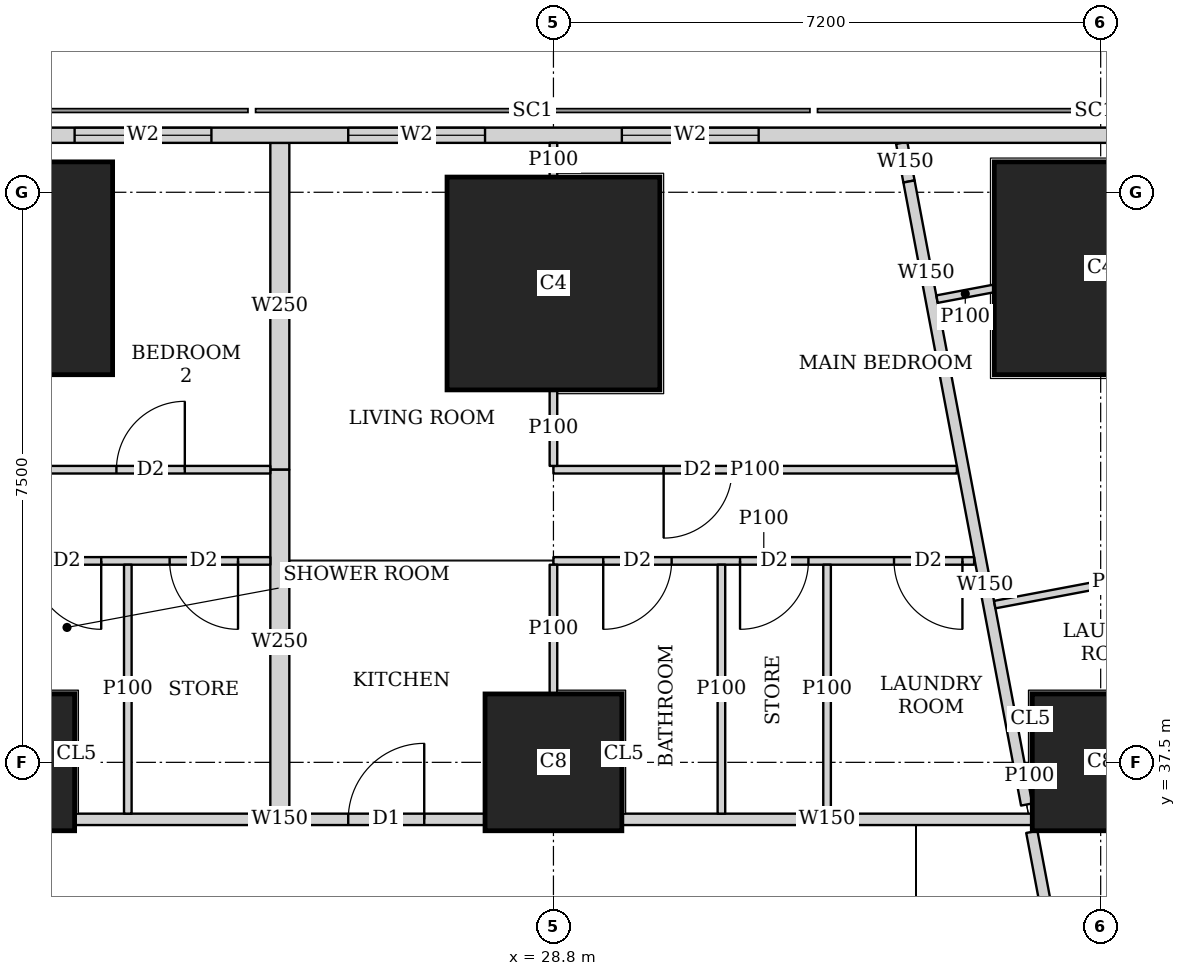
"""IFC4 building model, lengths in metres.
Left out: names, types, materials, properties, quantities, classifications, styles, units other than length and angle.
Written with IfcOpenShell. Run it as: python <this file> out.ifc"""

import sys

from ifc_helpers import new_model, si_unit, direction, frame, frame_2d, origin, origin_2d, place, context, subcontext, project, spatial, rectangle, extrude, element, fill, save


model = new_model("IFC4")
c1 = context("Model", 3, precision=1e-05, world=origin(), true_north=direction((0.0, 1.0)))
c2 = subcontext(c1, "Body", "Model", "MODEL_VIEW")
j1 = project(units=[si_unit("LENGTHUNIT", "METRE"), si_unit("PLANEANGLEUNIT", "RADIAN")], contexts=[c1])
p1 = place(None, origin())
s1 = spatial("IfcSite", under=j1, at=p1, CompositionType="ELEMENT")
p2 = place(p1, origin())
s2 = spatial("IfcBuilding", under=s1, at=p2, CompositionType="ELEMENT")
p3 = place(p2, frame((0.0, 0.0, 31.25)))
s3 = spatial("IfcBuildingStorey", under=s2, at=p3, CompositionType="ELEMENT", Elevation=31.25)
for number, where, z_axis, x_axis in (
    (1, (21.6, 37.5, 0.0), (0.0, 0.0, 1.0), (1.0, 0.0, 0.0)),
    (2, (28.8, 37.5, 0.0), (0.0, 0.0, 1.0), (1.0, 0.0, 0.0)),
    (3, (36.0, 37.5, 0.0), (0.0, 0.0, 1.0), (1.0, 0.0, 0.0)),
):
    element("IfcColumn", number, at=place(p3, frame(where, z_axis=z_axis, x_axis=x_axis)), inside=s3, PredefinedType="COLUMN", context=c2, shape_type="SweptSolid", body=[
        extrude(rectangle(XDim=1.8, YDim=1.8, at=origin_2d()), origin(), (0.0, 0.0, 1.0), 3.75),
    ])
for number, where, z_axis, x_axis in (
    (4, (21.6, 44.0, 0.0), (0.0, 0.0, 1.0), (1.0, 0.0, 0.0)),
    (5, (28.8, 43.8, 0.0), (0.0, 0.0, 1.0), (1.0, 0.0, 0.0)),
    (6, (36.0, 44.0, 0.0), (0.0, 0.0, 1.0), (1.0, 0.0, 0.0)),
):
    element("IfcColumn", number, at=place(p3, frame(where, z_axis=z_axis, x_axis=x_axis)), inside=s3, PredefinedType="COLUMN", context=c2, shape_type="SweptSolid", body=[
        extrude(rectangle(XDim=2.8, YDim=2.8, at=origin_2d()), origin(), (0.0, 0.0, 1.0), 3.75),
    ])
p4 = place(p3, frame((40.106, 45.75, 0.0), z_axis=(0.0, 0.0, 1.0), x_axis=(-1.0, 0.0, 0.0)))
e7 = element("IfcWall", 7, at=p4, inside=s3, PredefinedType="SOLIDWALL", context=c2, shape_type="SweptSolid", body=[
    extrude(rectangle(XDim=37.943, YDim=0.2, at=frame_2d((18.971, 0.0))), origin(), (0.0, 0.0, 1.0), 3.5),
])
p5 = place(p4, frame((8.606, 0.0, 0.9)))
e8 = element("IfcOpeningElement", 8, at=p5, cuts=e7, PredefinedType="OPENING", context=c2, shape_type="SweptSolid", body=[
    extrude(rectangle(XDim=1.8, YDim=1.5, at=frame_2d((0.9, 0.75))), frame((0.0, 0.11, 0.0), z_axis=(0.0, -1.0, 0.0), x_axis=(1.0, 0.0, 0.0)), (0.0, 0.0, 1.0), 0.22),
])
p6 = place(p4, frame((12.206, 0.0, 0.9)))
e9 = element("IfcOpeningElement", 9, at=p6, cuts=e7, PredefinedType="OPENING", context=c2, shape_type="SweptSolid", body=[
    extrude(rectangle(XDim=1.8, YDim=1.5, at=frame_2d((0.9, 0.75))), frame((0.0, 0.11, 0.0), z_axis=(0.0, -1.0, 0.0), x_axis=(1.0, 0.0, 0.0)), (0.0, 0.0, 1.0), 0.22),
])
p7 = place(p4, frame((15.806, 0.0, 0.9)))
e10 = element("IfcOpeningElement", 10, at=p7, cuts=e7, PredefinedType="OPENING", context=c2, shape_type="SweptSolid", body=[
    extrude(rectangle(XDim=1.8, YDim=1.5, at=frame_2d((0.9, 0.75))), frame((0.0, 0.11, 0.0), z_axis=(0.0, -1.0, 0.0), x_axis=(1.0, 0.0, 0.0)), (0.0, 0.0, 1.0), 0.22),
])
p8 = place(p4, frame((19.406, 0.0, 0.9)))
e11 = element("IfcOpeningElement", 11, at=p8, cuts=e7, PredefinedType="OPENING", context=c2, shape_type="SweptSolid", body=[
    extrude(rectangle(XDim=1.8, YDim=1.5, at=frame_2d((0.9, 0.75))), frame((0.0, 0.11, 0.0), z_axis=(0.0, -1.0, 0.0), x_axis=(1.0, 0.0, 0.0)), (0.0, 0.0, 1.0), 0.22),
])
p9 = place(p4, frame((23.006, 0.0, 0.9)))
e12 = element("IfcOpeningElement", 12, at=p9, cuts=e7, PredefinedType="OPENING", context=c2, shape_type="SweptSolid", body=[
    extrude(rectangle(XDim=1.8, YDim=1.5, at=frame_2d((0.9, 0.75))), frame((0.0, 0.11, 0.0), z_axis=(0.0, -1.0, 0.0), x_axis=(1.0, 0.0, 0.0)), (0.0, 0.0, 1.0), 0.22),
])
p10 = place(p4, frame((26.606, 0.0, 0.9)))
e13 = element("IfcOpeningElement", 13, at=p10, cuts=e7, PredefinedType="OPENING", context=c2, shape_type="SweptSolid", body=[
    extrude(rectangle(XDim=1.8, YDim=1.5, at=frame_2d((0.9, 0.75))), frame((0.0, 0.11, 0.0), z_axis=(0.0, -1.0, 0.0), x_axis=(1.0, 0.0, 0.0)), (0.0, 0.0, 1.0), 0.22),
])
p11 = place(p3, frame((22.501, 36.75, 0.0), z_axis=(0.0, 0.0, 1.0), x_axis=(1.0, 0.0, 0.0)))
e14 = element("IfcWall", 14, at=p11, inside=s3, PredefinedType="SOLIDWALL", context=c2, shape_type="SweptSolid", body=[
    extrude(rectangle(XDim=5.398, YDim=0.15, at=frame_2d((2.699, 0.0))), origin(), (0.0, 0.0, 1.0), 3.5),
])
p12 = place(p11, frame((3.599, 0.0, 0.0)))
e15 = element("IfcOpeningElement", 15, at=p12, cuts=e14, PredefinedType="OPENING", context=c2, shape_type="SweptSolid", body=[
    extrude(rectangle(XDim=1.0, YDim=2.1, at=frame_2d((0.5, 1.05))), frame((0.0, 0.085, 0.0), z_axis=(0.0, -1.0, 0.0), x_axis=(1.0, 0.0, 0.0)), (0.0, 0.0, 1.0), 0.17),
])
p13 = place(p3, frame((29.701, 36.75, 0.0), z_axis=(0.0, 0.0, 1.0), x_axis=(1.0, 0.0, 0.0)))
e16 = element("IfcWall", 16, at=p13, inside=s3, PredefinedType="SOLIDWALL", context=c2, shape_type="SweptSolid", body=[
    extrude(rectangle(XDim=5.399, YDim=0.15, at=frame_2d((2.7, 0.0))), origin(), (0.0, 0.0, 1.0), 3.5),
])
p14 = place(p3, frame((33.382, 45.65, 0.0), z_axis=(0.0, 0.0, 1.0), x_axis=(0.185657456326, -0.982614527122, 0.0)))
e17 = element("IfcWall", 17, at=p14, inside=s3, PredefinedType="SOLIDWALL", context=c2, shape_type="SweptSolid", body=[
    extrude(rectangle(XDim=0.517, YDim=0.15, at=frame_2d((0.258, 0.0))), origin(), (0.0, 0.0, 1.0), 3.5),
])
p15 = place(p3, frame((33.478, 45.142, 0.0), z_axis=(0.0, 0.0, 1.0), x_axis=(0.185393362436, -0.982664388876, 0.0)))
e18 = element("IfcWall", 18, at=p15, inside=s3, PredefinedType="SOLIDWALL", context=c2, shape_type="SweptSolid", body=[
    extrude(rectangle(XDim=2.455, YDim=0.15, at=frame_2d((1.227, 0.0))), origin(), (0.0, 0.0, 1.0), 2.05),
])
p16 = place(p3, frame((33.933, 42.73, 0.0), z_axis=(0.0, 0.0, 1.0), x_axis=(0.185617897238, -0.982622000682, 0.0)))
e19 = element("IfcWall", 19, at=p16, inside=s3, PredefinedType="SOLIDWALL", context=c2, shape_type="SweptSolid", body=[
    extrude(rectangle(XDim=5.887, YDim=0.15, at=frame_2d((2.944, 0.0))), origin(), (0.0, 0.0, 1.0), 3.5),
])
p17 = place(p3, frame((35.094, 36.585, 0.0), z_axis=(0.0, 0.0, 1.0), x_axis=(0.185588860311, -0.982627485331, 0.0)))
e20 = element("IfcWall", 20, at=p17, inside=s3, PredefinedType="SOLIDWALL", context=c2, shape_type="SweptSolid", body=[
    extrude(rectangle(XDim=34.797, YDim=0.15, at=frame_2d((17.399, 0.0))), origin(), (0.0, 0.0, 1.0), 2.5),
])
p18 = place(p17, frame((6.012, 0.0, 0.0)))
e21 = element("IfcOpeningElement", 21, at=p18, cuts=e20, PredefinedType="OPENING", context=c2, shape_type="SweptSolid", body=[
    extrude(rectangle(XDim=1.0, YDim=2.1, at=frame_2d((0.5, 1.05))), frame((0.0, 0.085, 0.0), z_axis=(0.0, -1.0, 0.0), x_axis=(1.0, 0.0, 0.0)), (0.0, 0.0, 1.0), 0.17),
])
p19 = place(p17, frame((9.828, 0.0, 0.0)))
e22 = element("IfcOpeningElement", 22, at=p19, cuts=e20, PredefinedType="OPENING", context=c2, shape_type="SweptSolid", body=[
    extrude(rectangle(XDim=1.0, YDim=2.1, at=frame_2d((0.5, 1.05))), frame((0.0, 0.085, 0.0), z_axis=(0.0, -1.0, 0.0), x_axis=(1.0, 0.0, 0.0)), (0.0, 0.0, 1.0), 0.17),
])
p20 = place(p17, frame((25.9, 0.0, 0.0)))
e23 = element("IfcOpeningElement", 23, at=p20, cuts=e20, PredefinedType="OPENING", context=c2, shape_type="SweptSolid", body=[
    extrude(rectangle(XDim=1.0, YDim=2.1, at=frame_2d((0.5, 1.05))), frame((0.0, 0.085, 0.0), z_axis=(0.0, -1.0, 0.0), x_axis=(1.0, 0.0, 0.0)), (0.0, 0.0, 1.0), 0.17),
])
p21 = place(p3, frame((34.59, 43.734, 0.0), z_axis=(0.0, 0.0, 1.0), x_axis=(-0.98274036184, -0.184990219229, 0.0)))
e24 = element("IfcWall", 24, at=p21, inside=s3, PredefinedType="PARTITIONING", context=c2, shape_type="SweptSolid", body=[
    extrude(rectangle(XDim=0.756, YDim=0.1, at=frame_2d((0.378, 0.0))), origin(), (0.0, 0.0, 1.0), 2.05),
])
p22 = place(p3, frame((37.823, 40.182, 0.0), z_axis=(0.0, 0.0, 1.0), x_axis=(-0.982664729897, -0.18539155487, 0.0)))
e25 = element("IfcWall", 25, at=p22, inside=s3, PredefinedType="PARTITIONING", context=c2, shape_type="SweptSolid", body=[
    extrude(rectangle(XDim=3.274, YDim=0.1, at=frame_2d((1.637, 0.0))), origin(), (0.0, 0.0, 1.0), 3.5),
])
p23 = place(p3, frame((35.09, 37.328, 0.0), z_axis=(0.0, 0.0, 1.0), x_axis=(-0.982590620415, -0.185783940835, 0.0)))
e26 = element("IfcWall", 26, at=p23, inside=s3, PredefinedType="PARTITIONING", context=c2, shape_type="SweptSolid", body=[
    extrude(rectangle(XDim=0.059, YDim=0.1, at=frame_2d((0.03, 0.0))), origin(), (0.0, 0.0, 1.0), 3.5),
])
p24 = place(p3, frame((18.0, 41.35, 0.0), z_axis=(0.0, 0.0, 1.0), x_axis=(1.0, 0.0, 0.0)))
e27 = element("IfcWall", 27, at=p24, inside=s3, PredefinedType="PARTITIONING", context=c2, shape_type="SweptSolid", body=[
    extrude(rectangle(XDim=7.075, YDim=0.1, at=frame_2d((3.538, 0.0))), origin(), (0.0, 0.0, 1.0), 3.5),
])
p25 = place(p24, frame((0.2, 0.0, 0.0)))
e28 = element("IfcOpeningElement", 28, at=p25, cuts=e27, PredefinedType="OPENING", context=c2, shape_type="SweptSolid", body=[
    extrude(rectangle(XDim=0.9, YDim=2.1, at=frame_2d((0.45, 1.05))), frame((0.0, 0.06, 0.0), z_axis=(0.0, -1.0, 0.0), x_axis=(1.0, 0.0, 0.0)), (0.0, 0.0, 1.0), 0.12),
])
p26 = place(p24, frame((5.05, 0.0, 0.0)))
e29 = element("IfcOpeningElement", 29, at=p26, cuts=e27, PredefinedType="OPENING", context=c2, shape_type="SweptSolid", body=[
    extrude(rectangle(XDim=0.9, YDim=2.1, at=frame_2d((0.45, 1.05))), frame((0.0, 0.06, 0.0), z_axis=(0.0, -1.0, 0.0), x_axis=(1.0, 0.0, 0.0)), (0.0, 0.0, 1.0), 0.12),
])
p27 = place(p3, frame((18.0, 40.15, 0.0), z_axis=(0.0, 0.0, 1.0), x_axis=(1.0, 0.0, 0.0)))
e30 = element("IfcWall", 30, at=p27, inside=s3, PredefinedType="PARTITIONING", context=c2, shape_type="SweptSolid", body=[
    extrude(rectangle(XDim=7.075, YDim=0.1, at=frame_2d((3.538, 0.0))), origin(), (0.0, 0.0, 1.0), 3.5),
])
p28 = place(p27, frame((0.655, 0.0, 0.0)))
e31 = element("IfcOpeningElement", 31, at=p28, cuts=e30, PredefinedType="OPENING", context=c2, shape_type="SweptSolid", body=[
    extrude(rectangle(XDim=0.9, YDim=2.1, at=frame_2d((0.45, 1.05))), frame((0.0, 0.06, 0.0), z_axis=(0.0, -1.0, 0.0), x_axis=(1.0, 0.0, 0.0)), (0.0, 0.0, 1.0), 0.12),
])
p29 = place(p27, frame((3.95, 0.0, 0.0)))
e32 = element("IfcOpeningElement", 32, at=p29, cuts=e30, PredefinedType="OPENING", context=c2, shape_type="SweptSolid", body=[
    extrude(rectangle(XDim=0.9, YDim=2.1, at=frame_2d((0.45, 1.05))), frame((0.0, 0.06, 0.0), z_axis=(0.0, -1.0, 0.0), x_axis=(1.0, 0.0, 0.0)), (0.0, 0.0, 1.0), 0.12),
])
p30 = place(p27, frame((2.455, 0.0, 0.0)))
e33 = element("IfcOpeningElement", 33, at=p30, cuts=e30, PredefinedType="OPENING", context=c2, shape_type="SweptSolid", body=[
    extrude(rectangle(XDim=0.9, YDim=2.1, at=frame_2d((0.45, 1.05))), frame((0.0, 0.06, 0.0), z_axis=(0.0, -1.0, 0.0), x_axis=(1.0, 0.0, 0.0)), (0.0, 0.0, 1.0), 0.12),
])
p31 = place(p27, frame((5.75, 0.0, 0.0)))
e34 = element("IfcOpeningElement", 34, at=p31, cuts=e30, PredefinedType="OPENING", context=c2, shape_type="SweptSolid", body=[
    extrude(rectangle(XDim=0.9, YDim=2.1, at=frame_2d((0.45, 1.05))), frame((0.0, 0.06, 0.0), z_axis=(0.0, -1.0, 0.0), x_axis=(1.0, 0.0, 0.0)), (0.0, 0.0, 1.0), 0.12),
])
p32 = place(p3, frame((23.2, 36.825, 0.0), z_axis=(0.0, 0.0, 1.0), x_axis=(0.0, 1.0, 0.0)))
e35 = element("IfcWall", 35, at=p32, inside=s3, PredefinedType="PARTITIONING", context=c2, shape_type="SweptSolid", body=[
    extrude(rectangle(XDim=3.275, YDim=0.1, at=frame_2d((1.638, 0.0))), origin(), (0.0, 0.0, 1.0), 3.5),
])
p33 = place(p3, frame((28.8, 41.35, 0.0), z_axis=(0.0, 0.0, 1.0), x_axis=(1.0, 0.0, 0.0)))
e36 = element("IfcWall", 36, at=p33, inside=s3, PredefinedType="PARTITIONING", context=c2, shape_type="SweptSolid", body=[
    extrude(rectangle(XDim=5.308, YDim=0.1, at=frame_2d((2.654, 0.0))), origin(), (0.0, 0.0, 1.0), 3.5),
])
p34 = place(p33, frame((1.45, 0.0, 0.0)))
e37 = element("IfcOpeningElement", 37, at=p34, cuts=e36, PredefinedType="OPENING", context=c2, shape_type="SweptSolid", body=[
    extrude(rectangle(XDim=0.9, YDim=2.1, at=frame_2d((0.45, 1.05))), frame((0.0, 0.06, 0.0), z_axis=(0.0, -1.0, 0.0), x_axis=(1.0, 0.0, 0.0)), (0.0, 0.0, 1.0), 0.12),
])
p35 = place(p3, frame((28.8, 40.15, 0.0), z_axis=(0.0, 0.0, 1.0), x_axis=(1.0, 0.0, 0.0)))
e38 = element("IfcWall", 38, at=p35, inside=s3, PredefinedType="PARTITIONING", context=c2, shape_type="SweptSolid", body=[
    extrude(rectangle(XDim=5.535, YDim=0.1, at=frame_2d((2.768, 0.0))), origin(), (0.0, 0.0, 1.0), 3.5),
])
p36 = place(p35, frame((0.655, 0.0, 0.0)))
e39 = element("IfcOpeningElement", 39, at=p36, cuts=e38, PredefinedType="OPENING", context=c2, shape_type="SweptSolid", body=[
    extrude(rectangle(XDim=0.9, YDim=2.1, at=frame_2d((0.45, 1.05))), frame((0.0, 0.06, 0.0), z_axis=(0.0, -1.0, 0.0), x_axis=(1.0, 0.0, 0.0)), (0.0, 0.0, 1.0), 0.12),
])
p37 = place(p35, frame((4.481, 0.0, 0.0)))
e40 = element("IfcOpeningElement", 40, at=p37, cuts=e38, PredefinedType="OPENING", context=c2, shape_type="SweptSolid", body=[
    extrude(rectangle(XDim=0.9, YDim=2.1, at=frame_2d((0.45, 1.05))), frame((0.0, 0.06, 0.0), z_axis=(0.0, -1.0, 0.0), x_axis=(1.0, 0.0, 0.0)), (0.0, 0.0, 1.0), 0.12),
])
p38 = place(p35, frame((2.455, 0.0, 0.0)))
e41 = element("IfcOpeningElement", 41, at=p38, cuts=e38, PredefinedType="OPENING", context=c2, shape_type="SweptSolid", body=[
    extrude(rectangle(XDim=0.9, YDim=2.1, at=frame_2d((0.45, 1.05))), frame((0.0, 0.06, 0.0), z_axis=(0.0, -1.0, 0.0), x_axis=(1.0, 0.0, 0.0)), (0.0, 0.0, 1.0), 0.12),
])
p39 = place(p3, frame((28.8, 41.4, 0.0), z_axis=(0.0, 0.0, 1.0), x_axis=(0.0, 1.0, 0.0)))
e42 = element("IfcWall", 42, at=p39, inside=s3, PredefinedType="PARTITIONING", context=c2, shape_type="SweptSolid", body=[
    extrude(rectangle(XDim=0.999, YDim=0.1, at=frame_2d((0.5, 0.0))), origin(), (0.0, 0.0, 1.0), 3.5),
])
p40 = place(p3, frame((28.8, 45.201, 0.0), z_axis=(0.0, 0.0, 1.0), x_axis=(0.0, 1.0, 0.0)))
e43 = element("IfcWall", 43, at=p40, inside=s3, PredefinedType="PARTITIONING", context=c2, shape_type="SweptSolid", body=[
    extrude(rectangle(XDim=0.449, YDim=0.1, at=frame_2d((0.225, 0.0))), origin(), (0.0, 0.0, 1.0), 3.5),
])
p41 = place(p3, frame((28.8, 38.401, 0.0), z_axis=(0.0, 0.0, 1.0), x_axis=(0.0, 1.0, 0.0)))
e44 = element("IfcWall", 44, at=p41, inside=s3, PredefinedType="PARTITIONING", context=c2, shape_type="SweptSolid", body=[
    extrude(rectangle(XDim=1.699, YDim=0.1, at=frame_2d((0.85, 0.0))), origin(), (0.0, 0.0, 1.0), 3.5),
])
for number, where, z_axis, x_axis in (
    (45, (32.4, 36.825, 0.0), (0.0, 0.0, 1.0), (0.0, 1.0, 0.0)),
    (46, (31.01, 36.825, 0.0), (0.0, 0.0, 1.0), (0.0, 1.0, 0.0)),
):
    element("IfcWall", number, at=place(p3, frame(where, z_axis=z_axis, x_axis=x_axis)), inside=s3, PredefinedType="PARTITIONING", context=c2, shape_type="SweptSolid", body=[
        extrude(rectangle(XDim=3.275, YDim=0.1, at=frame_2d((1.638, 0.0))), origin(), (0.0, 0.0, 1.0), 3.5),
    ])
p42 = place(p3, frame((25.2, 41.35, 0.0), z_axis=(0.0, 0.0, 1.0), x_axis=(0.0, 1.0, 0.0)))
e47 = element("IfcWall", 47, at=p42, inside=s3, PredefinedType="SOLIDWALL", context=c2, shape_type="SweptSolid", body=[
    extrude(rectangle(XDim=4.3, YDim=0.25, at=frame_2d((2.15, 0.0))), origin(), (0.0, 0.0, 1.0), 2.05),
])
p43 = place(p3, frame((25.2, 36.825, 0.0), z_axis=(0.0, 0.0, 1.0), x_axis=(0.0, 1.0, 0.0)))
e48 = element("IfcWall", 48, at=p43, inside=s3, PredefinedType="SOLIDWALL", context=c2, shape_type="SweptSolid", body=[
    extrude(rectangle(XDim=4.525, YDim=0.25, at=frame_2d((2.263, 0.0))), origin(), (0.0, 0.0, 1.0), 3.5),
])
p44 = place(p5, origin())
e49 = element("IfcWindow", 49, at=p44, inside=s3, PartitioningType="SINGLE_PANEL", PredefinedType="WINDOW", context=c2, shape_type="SweptSolid", body=[
    extrude(rectangle(XDim=1.8, YDim=1.5, at=frame_2d((0.9, 0.75))), frame((0.0, 0.03, 0.0), z_axis=(0.0, -1.0, 0.0), x_axis=(1.0, 0.0, 0.0)), (0.0, 0.0, 1.0), 0.06),
])
fill(e8, e49)
p45 = place(p6, origin())
e50 = element("IfcWindow", 50, at=p45, inside=s3, PartitioningType="SINGLE_PANEL", PredefinedType="WINDOW", context=c2, shape_type="SweptSolid", body=[
    extrude(rectangle(XDim=1.8, YDim=1.5, at=frame_2d((0.9, 0.75))), frame((0.0, 0.03, 0.0), z_axis=(0.0, -1.0, 0.0), x_axis=(1.0, 0.0, 0.0)), (0.0, 0.0, 1.0), 0.06),
])
fill(e9, e50)
p46 = place(p7, origin())
e51 = element("IfcWindow", 51, at=p46, inside=s3, PartitioningType="SINGLE_PANEL", PredefinedType="WINDOW", context=c2, shape_type="SweptSolid", body=[
    extrude(rectangle(XDim=1.8, YDim=1.5, at=frame_2d((0.9, 0.75))), frame((0.0, 0.03, 0.0), z_axis=(0.0, -1.0, 0.0), x_axis=(1.0, 0.0, 0.0)), (0.0, 0.0, 1.0), 0.06),
])
fill(e10, e51)
p47 = place(p26, origin())
e52 = element("IfcDoor", 52, at=p47, inside=s3, OperationType="SINGLE_SWING_RIGHT", PredefinedType="DOOR", context=c2, shape_type="SweptSolid", body=[
    extrude(rectangle(XDim=0.9, YDim=2.1, at=frame_2d((0.45, 1.05))), frame((0.0, 0.025, 0.0), z_axis=(0.0, -1.0, 0.0), x_axis=(1.0, 0.0, 0.0)), (0.0, 0.0, 1.0), 0.05),
])
fill(e29, e52)
p48 = place(p29, origin())
e53 = element("IfcDoor", 53, at=p48, inside=s3, OperationType="SINGLE_SWING_LEFT", PredefinedType="DOOR", context=c2, shape_type="SweptSolid", body=[
    extrude(rectangle(XDim=0.9, YDim=2.1, at=frame_2d((0.45, 1.05))), frame((0.0, 0.025, 0.0), z_axis=(0.0, -1.0, 0.0), x_axis=(1.0, 0.0, 0.0)), (0.0, 0.0, 1.0), 0.05),
])
fill(e32, e53)
p49 = place(p31, origin())
e54 = element("IfcDoor", 54, at=p49, inside=s3, OperationType="SINGLE_SWING_LEFT", PredefinedType="DOOR", context=c2, shape_type="SweptSolid", body=[
    extrude(rectangle(XDim=0.9, YDim=2.1, at=frame_2d((0.45, 1.05))), frame((0.0, 0.025, 0.0), z_axis=(0.0, -1.0, 0.0), x_axis=(1.0, 0.0, 0.0)), (0.0, 0.0, 1.0), 0.05),
])
fill(e34, e54)
p50 = place(p34, origin())
e55 = element("IfcDoor", 55, at=p50, inside=s3, OperationType="SINGLE_SWING_RIGHT", PredefinedType="DOOR", context=c2, shape_type="SweptSolid", body=[
    extrude(rectangle(XDim=0.9, YDim=2.1, at=frame_2d((0.45, 1.05))), frame((0.0, 0.025, 0.0), z_axis=(0.0, -1.0, 0.0), x_axis=(1.0, 0.0, 0.0)), (0.0, 0.0, 1.0), 0.05),
])
fill(e37, e55)
p51 = place(p36, origin())
e56 = element("IfcDoor", 56, at=p51, inside=s3, OperationType="SINGLE_SWING_RIGHT", PredefinedType="DOOR", context=c2, shape_type="SweptSolid", body=[
    extrude(rectangle(XDim=0.9, YDim=2.1, at=frame_2d((0.45, 1.05))), frame((0.0, 0.025, 0.0), z_axis=(0.0, -1.0, 0.0), x_axis=(1.0, 0.0, 0.0)), (0.0, 0.0, 1.0), 0.05),
])
fill(e39, e56)
p52 = place(p37, origin())
e57 = element("IfcDoor", 57, at=p52, inside=s3, OperationType="SINGLE_SWING_LEFT", PredefinedType="DOOR", context=c2, shape_type="SweptSolid", body=[
    extrude(rectangle(XDim=0.9, YDim=2.1, at=frame_2d((0.45, 1.05))), frame((0.0, 0.025, 0.0), z_axis=(0.0, -1.0, 0.0), x_axis=(1.0, 0.0, 0.0)), (0.0, 0.0, 1.0), 0.05),
])
fill(e40, e57)
p53 = place(p38, origin())
e58 = element("IfcDoor", 58, at=p53, inside=s3, OperationType="SINGLE_SWING_RIGHT", PredefinedType="DOOR", context=c2, shape_type="SweptSolid", body=[
    extrude(rectangle(XDim=0.9, YDim=2.1, at=frame_2d((0.45, 1.05))), frame((0.0, 0.025, 0.0), z_axis=(0.0, -1.0, 0.0), x_axis=(1.0, 0.0, 0.0)), (0.0, 0.0, 1.0), 0.05),
])
fill(e41, e58)
p54 = place(p12, origin())
e59 = element("IfcDoor", 59, at=p54, inside=s3, OperationType="SINGLE_SWING_RIGHT", PredefinedType="DOOR", context=c2, shape_type="SweptSolid", body=[
    extrude(rectangle(XDim=1.0, YDim=2.1, at=frame_2d((0.5, 1.05))), frame((0.0, 0.025, 0.0), z_axis=(0.0, -1.0, 0.0), x_axis=(1.0, 0.0, 0.0)), (0.0, 0.0, 1.0), 0.05),
])
fill(e15, e59)
save(model, sys.argv[1])
